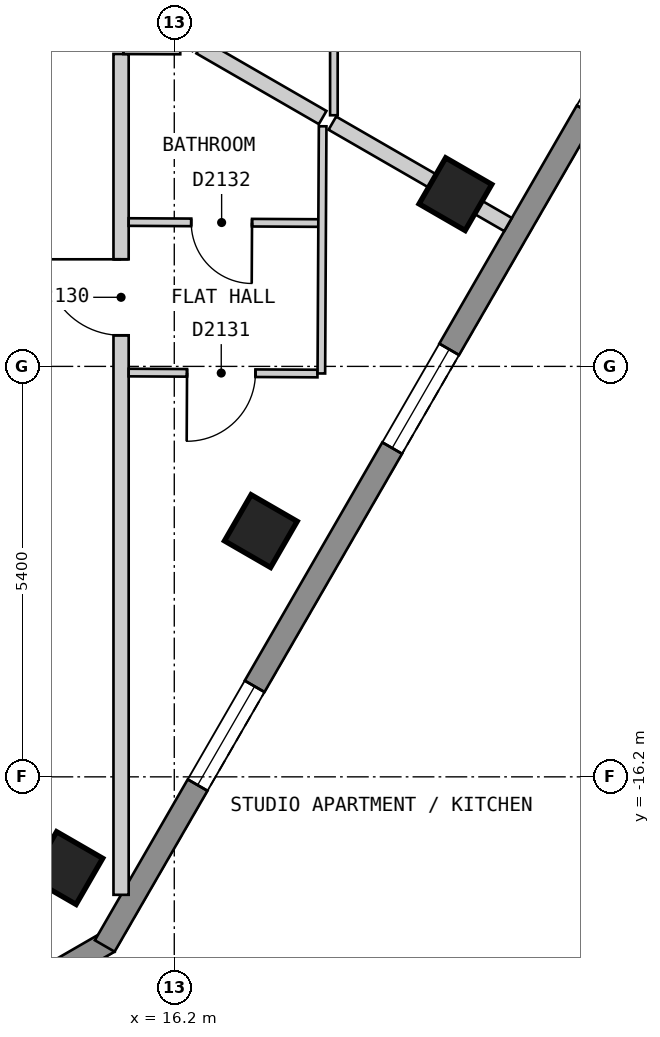
"""IFC4 building model, lengths in metres.
Left out: names, types, materials, properties, quantities, classifications, styles, units other than length and angle.
Written with IfcOpenShell. Run it as: python <this file> out.ifc"""

import sys

from ifc_helpers import new_model, si_unit, direction, frame, frame_2d, origin, origin_2d, place, context, subcontext, project, spatial, polyline, rectangle, outline, extrude, element, fill, save


model = new_model("IFC4")
c1 = context("Model", 3, precision=1e-05, world=origin(), true_north=direction((0.0, 1.0)))
c2 = subcontext(c1, "Body", "Model", "MODEL_VIEW")
j1 = project(units=[si_unit("LENGTHUNIT", "METRE"), si_unit("PLANEANGLEUNIT", "RADIAN")], contexts=[c1])
p1 = place(None, origin())
s1 = spatial("IfcSite", under=j1, at=p1, CompositionType="ELEMENT")
p2 = place(p1, origin())
s2 = spatial("IfcBuilding", under=s1, at=p2, CompositionType="ELEMENT")
p3 = place(p2, frame((0.0, 0.0, 211.8)))
s3 = spatial("IfcBuildingStorey", under=s2, at=p3, CompositionType="ELEMENT", Elevation=211.8)
for number, where, z_axis, x_axis in (
    (1, (14.78, -17.4, 0.0), (0.0, 0.0, 1.0), (0.5, 0.866, 0.0)),
    (2, (17.339, -12.967, 0.0), (0.0, 0.0, 1.0), (0.5, 0.866, 0.0)),
    (3, (19.899, -8.534, 0.0), (0.0, 0.0, 1.0), (0.5, 0.866, 0.0)),
):
    element("IfcColumn", number, at=place(p3, frame(where, z_axis=z_axis, x_axis=x_axis)), inside=s3, PredefinedType="COLUMN", context=c2, shape_type="SweptSolid", body=[
        extrude(rectangle(XDim=0.7, YDim=0.7, at=origin_2d()), origin(), (0.0, 0.0, 1.0), 3.0),
    ])
p4 = place(p3, frame((11.01, -20.87, 0.0), z_axis=(0.0, 0.0, 1.0), x_axis=(0.866022959057, 0.500004234368, 0.0)))
e4 = element("IfcWall", 4, at=p4, inside=s3, PredefinedType="SOLIDWALL", context=c2, shape_type="SweptSolid", body=[
    extrude(outline(polyline([(0.0, -0.15), (5.0, -0.15), (4.92, 0.15), (0.08, 0.15), (0.0, -0.15)])), origin(), (0.0, 0.0, 1.0), 2.7),
])
p5 = place(p4, frame((0.65, 0.0, 0.15)))
e5 = element("IfcOpeningElement", 5, at=p5, cuts=e4, PredefinedType="OPENING", context=c2, shape_type="SweptSolid", body=[
    extrude(rectangle(XDim=1.2, YDim=2.1, at=frame_2d((0.6, 1.05))), frame((0.0, 0.16, 0.0), z_axis=(0.0, -1.0, 0.0), x_axis=(1.0, 0.0, 0.0)), (0.0, 0.0, 1.0), 0.32),
])
p6 = place(p3, frame((15.285, -18.425, 0.0), z_axis=(0.0, 0.0, 1.0), x_axis=(0.500012653391, 0.866018098222, 0.0)))
e6 = element("IfcWall", 6, at=p6, inside=s3, PredefinedType="SOLIDWALL", context=c2, shape_type="SweptSolid", body=[
    extrude(outline(polyline([(0.0, -0.15), (16.628, -0.15), (16.548, 0.15), (0.08, 0.15), (0.0, -0.15)])), origin(), (0.0, 0.0, 1.0), 2.7),
])
p7 = place(p6, frame((2.444, 0.0, 0.15)))
e7 = element("IfcOpeningElement", 7, at=p7, cuts=e6, PredefinedType="OPENING", context=c2, shape_type="SweptSolid", body=[
    extrude(rectangle(XDim=1.5, YDim=2.1, at=frame_2d((0.75, 1.05))), frame((0.0, 0.16, 0.0), z_axis=(0.0, -1.0, 0.0), x_axis=(1.0, 0.0, 0.0)), (0.0, 0.0, 1.0), 0.32),
])
p8 = place(p6, frame((7.564, 0.0, 0.15)))
e8 = element("IfcOpeningElement", 8, at=p8, cuts=e6, PredefinedType="OPENING", context=c2, shape_type="SweptSolid", body=[
    extrude(rectangle(XDim=1.5, YDim=2.1, at=frame_2d((0.75, 1.05))), frame((0.0, 0.16, 0.0), z_axis=(0.0, -1.0, 0.0), x_axis=(1.0, 0.0, 0.0)), (0.0, 0.0, 1.0), 0.32),
])
p9 = place(p6, frame((12.682, 0.0, 0.15)))
e9 = element("IfcOpeningElement", 9, at=p9, cuts=e6, PredefinedType="OPENING", context=c2, shape_type="SweptSolid", body=[
    extrude(rectangle(XDim=1.5, YDim=2.1, at=frame_2d((0.75, 1.05))), frame((0.0, 0.16, 0.0), z_axis=(0.0, -1.0, 0.0), x_axis=(1.0, 0.0, 0.0)), (0.0, 0.0, 1.0), 0.32),
])
p10 = place(p3, frame((15.5, -17.752, 0.0), z_axis=(0.0, 0.0, 1.0), x_axis=(0.0, 1.0, 0.0)))
e10 = element("IfcWall", 10, at=p10, inside=s3, PredefinedType="PARTITIONING", context=c2, shape_type="SweptSolid", body=[
    extrude(rectangle(XDim=11.062, YDim=0.2, at=frame_2d((5.531, 0.0))), origin(), (0.0, 0.0, 1.0), 2.7),
])
p11 = place(p10, frame((7.361, 0.0, 0.0)))
e11 = element("IfcOpeningElement", 11, at=p11, cuts=e10, PredefinedType="OPENING", context=c2, shape_type="SweptSolid", body=[
    extrude(rectangle(XDim=1.0, YDim=2.1, at=frame_2d((0.5, 1.05))), frame((0.0, 0.11, 0.0), z_axis=(0.0, -1.0, 0.0), x_axis=(1.0, 0.0, 0.0)), (0.0, 0.0, 1.0), 0.22),
])
p12 = place(p3, frame((15.6, -8.901, 0.0), z_axis=(0.0, 0.0, 1.0), x_axis=(0.999986038514, -0.005284200615, 0.0)))
e12 = element("IfcWall", 12, at=p12, inside=s3, PredefinedType="PARTITIONING", context=c2, shape_type="SweptSolid", body=[
    extrude(rectangle(XDim=2.495, YDim=0.1, at=frame_2d((1.248, 0.0))), origin(), (0.0, 0.0, 1.0), 2.7),
])
p13 = place(p12, frame((0.823, 0.0, 0.0)))
e13 = element("IfcOpeningElement", 13, at=p13, cuts=e12, PredefinedType="OPENING", context=c2, shape_type="SweptSolid", body=[
    extrude(rectangle(XDim=0.8, YDim=2.1, at=frame_2d((0.4, 1.05))), frame((0.0, 0.06, 0.0), z_axis=(0.0, -1.0, 0.0), x_axis=(1.0, 0.0, 0.0)), (0.0, 0.0, 1.0), 0.12),
])
p14 = place(p3, frame((15.6, -10.881, 0.0), z_axis=(0.0, 0.0, 1.0), x_axis=(0.999986431575, -0.005209286502, 0.0)))
e14 = element("IfcWall", 14, at=p14, inside=s3, PredefinedType="PARTITIONING", context=c2, shape_type="SweptSolid", body=[
    extrude(rectangle(XDim=2.484, YDim=0.1, at=frame_2d((1.242, 0.0))), origin(), (0.0, 0.0, 1.0), 2.7),
])
p15 = place(p14, frame((0.768, 0.0, 0.0)))
e15 = element("IfcOpeningElement", 15, at=p15, cuts=e14, PredefinedType="OPENING", context=c2, shape_type="SweptSolid", body=[
    extrude(rectangle(XDim=0.9, YDim=2.1, at=frame_2d((0.45, 1.05))), frame((0.0, 0.06, 0.0), z_axis=(0.0, -1.0, 0.0), x_axis=(1.0, 0.0, 0.0)), (0.0, 0.0, 1.0), 0.12),
])
p16 = place(p3, frame((18.135, -10.893, 0.0), z_axis=(0.0, 0.0, 1.0), x_axis=(0.005255182688, 0.999986191432, 0.0)))
e16 = element("IfcWall", 16, at=p16, inside=s3, PredefinedType="PARTITIONING", context=c2, shape_type="SweptSolid", body=[
    extrude(rectangle(XDim=3.252, YDim=0.1, at=frame_2d((1.626, 0.0))), origin(), (0.0, 0.0, 1.0), 2.7),
])
p17 = place(p3, frame((18.3, -7.496, 0.0), z_axis=(0.0, 0.0, 1.0), x_axis=(0.0, 1.0, 0.0)))
e17 = element("IfcWall", 17, at=p17, inside=s3, PredefinedType="PARTITIONING", context=c2, shape_type="SweptSolid", body=[
    extrude(rectangle(XDim=5.17, YDim=0.1, at=frame_2d((2.585, 0.0))), origin(), (0.0, 0.0, 1.0), 2.7),
])
p18 = place(p17, frame((3.794, 0.0, 0.0)))
e18 = element("IfcOpeningElement", 18, at=p18, cuts=e17, PredefinedType="OPENING", context=c2, shape_type="SweptSolid", body=[
    extrude(rectangle(XDim=0.9, YDim=2.1, at=frame_2d((0.45, 1.05))), frame((0.0, 0.06, 0.0), z_axis=(0.0, -1.0, 0.0), x_axis=(1.0, 0.0, 0.0)), (0.0, 0.0, 1.0), 0.12),
])
p19 = place(p3, frame((15.53, -6.591, 0.0), z_axis=(0.0, 0.0, 1.0), x_axis=(0.999992350786, -0.003911312976, 0.0)))
e19 = element("IfcWall", 19, at=p19, inside=s3, PredefinedType="PARTITIONING", context=c2, shape_type="SweptSolid", body=[
    extrude(rectangle(XDim=0.749, YDim=0.2, at=frame_2d((0.375, 0.0))), origin(), (0.0, 0.0, 1.0), 2.7),
])
p20 = place(p3, frame((16.541, -6.596, 0.0), z_axis=(0.0, 0.0, 1.0), x_axis=(0.866078502609, -0.499908018857, 0.0)))
e20 = element("IfcWall", 20, at=p20, inside=s3, PredefinedType="PARTITIONING", context=c2, shape_type="SweptSolid", body=[
    extrude(rectangle(XDim=1.86, YDim=0.2, at=frame_2d((0.93, 0.0))), origin(), (0.0, 0.0, 1.0), 2.7),
])
p21 = place(p3, frame((18.28, -7.6, 0.0), z_axis=(0.0, 0.0, 1.0), x_axis=(0.866072847874, -0.499917815422, 0.0)))
e21 = element("IfcWall", 21, at=p21, inside=s3, PredefinedType="PARTITIONING", context=c2, shape_type="SweptSolid", body=[
    extrude(rectangle(XDim=2.668, YDim=0.2, at=frame_2d((1.334, 0.0))), origin(), (0.0, 0.0, 1.0), 2.7),
])
p22 = place(p7, origin())
e22 = element("IfcWindow", 22, at=p22, inside=s3, PartitioningType="SINGLE_PANEL", PredefinedType="WINDOW", context=c2, shape_type="SweptSolid", body=[
    extrude(rectangle(XDim=1.5, YDim=2.1, at=frame_2d((0.75, 1.05))), frame((0.0, 0.03, 0.0), z_axis=(0.0, -1.0, 0.0), x_axis=(1.0, 0.0, 0.0)), (0.0, 0.0, 1.0), 0.06),
])
fill(e7, e22)
p23 = place(p8, origin())
e23 = element("IfcWindow", 23, at=p23, inside=s3, PartitioningType="SINGLE_PANEL", PredefinedType="WINDOW", context=c2, shape_type="SweptSolid", body=[
    extrude(rectangle(XDim=1.5, YDim=2.1, at=frame_2d((0.75, 1.05))), frame((0.0, 0.03, 0.0), z_axis=(0.0, -1.0, 0.0), x_axis=(1.0, 0.0, 0.0)), (0.0, 0.0, 1.0), 0.06),
])
fill(e8, e23)
p24 = place(p11, origin())
e24 = element("IfcDoor", 24, at=p24, inside=s3, OperationType="SINGLE_SWING_RIGHT", PredefinedType="DOOR", context=c2, shape_type="SweptSolid", body=[
    extrude(rectangle(XDim=1.0, YDim=2.1, at=frame_2d((0.5, 1.05))), frame((0.0, 0.025, 0.0), z_axis=(0.0, -1.0, 0.0), x_axis=(1.0, 0.0, 0.0)), (0.0, 0.0, 1.0), 0.05),
])
fill(e11, e24)
p25 = place(p15, origin())
e25 = element("IfcDoor", 25, at=p25, inside=s3, OperationType="SINGLE_SWING_LEFT", PredefinedType="DOOR", context=c2, shape_type="SweptSolid", body=[
    extrude(rectangle(XDim=0.9, YDim=2.1, at=frame_2d((0.45, 1.05))), frame((0.0, 0.025, 0.0), z_axis=(0.0, -1.0, 0.0), x_axis=(1.0, 0.0, 0.0)), (0.0, 0.0, 1.0), 0.05),
])
fill(e15, e25)
p26 = place(p13, origin())
e26 = element("IfcDoor", 26, at=p26, inside=s3, OperationType="SINGLE_SWING_RIGHT", PredefinedType="DOOR", context=c2, shape_type="SweptSolid", body=[
    extrude(rectangle(XDim=0.8, YDim=2.1, at=frame_2d((0.4, 1.05))), frame((0.0, 0.025, 0.0), z_axis=(0.0, -1.0, 0.0), x_axis=(1.0, 0.0, 0.0)), (0.0, 0.0, 1.0), 0.05),
])
fill(e13, e26)
save(model, sys.argv[1])
